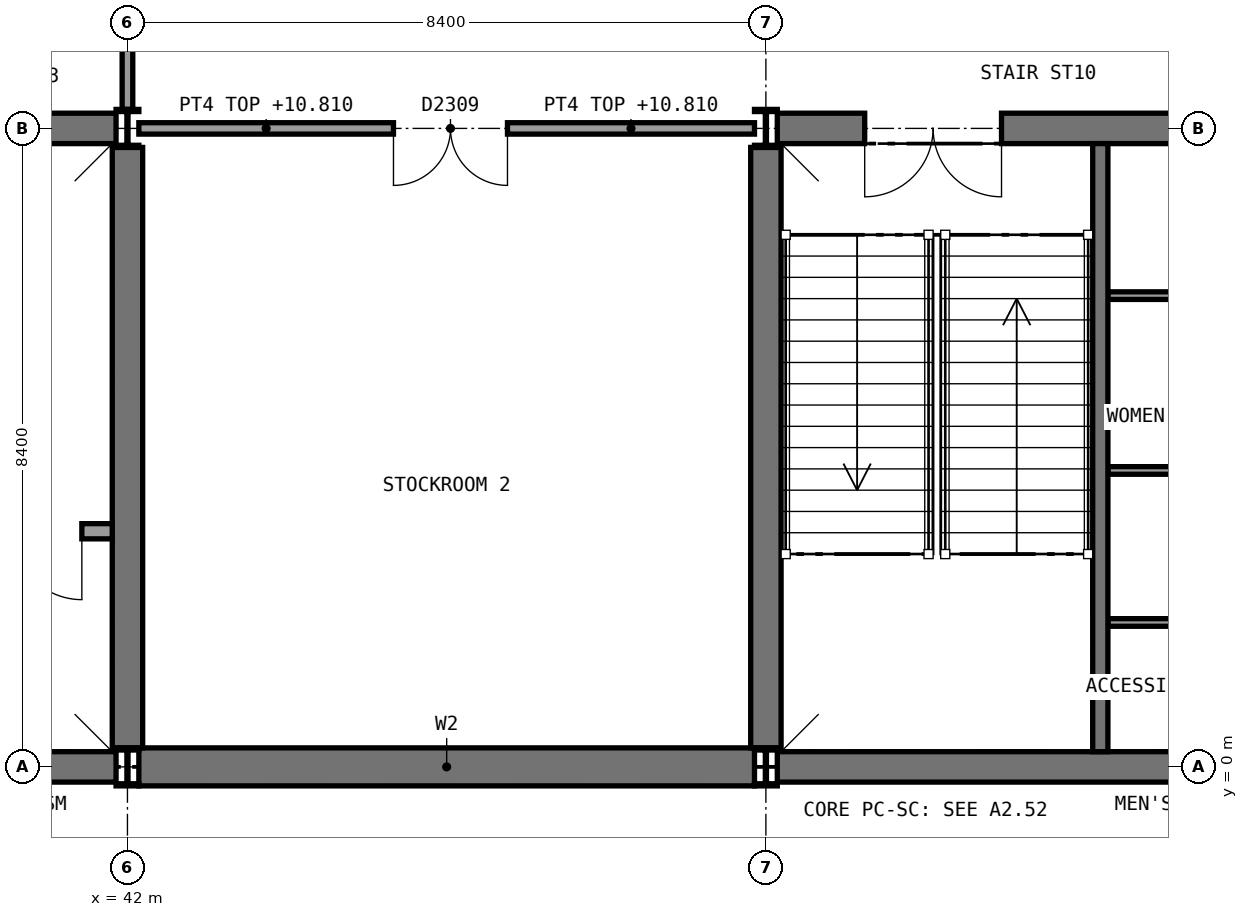
"""IFC4 building model, lengths in metres.
Left out: names, types, materials, properties, quantities, classifications, styles, units other than length and angle.
Written with IfcOpenShell. Run it as: python <this file> out.ifc"""

import sys

from ifc_helpers import new_model, si_unit, direction, frame, frame_2d, origin, origin_2d, place, context, subcontext, project, spatial, rectangle, i_section, extrude, element, fill, save


model = new_model("IFC4")
c1 = context("Model", 3, precision=1e-05, world=origin(), true_north=direction((0.0, 1.0)))
c2 = subcontext(c1, "Body", "Model", "MODEL_VIEW")
j1 = project(units=[si_unit("LENGTHUNIT", "METRE"), si_unit("PLANEANGLEUNIT", "RADIAN")], contexts=[c1])
p1 = place(None, origin())
s1 = spatial("IfcSite", under=j1, at=p1, CompositionType="ELEMENT")
p2 = place(p1, origin())
s2 = spatial("IfcBuilding", under=s1, at=p2, CompositionType="ELEMENT")
p3 = place(p2, frame((0.0, 0.0, 6.0)))
s3 = spatial("IfcBuildingStorey", under=s2, at=p3, CompositionType="ELEMENT", Elevation=6.0)
p4 = place(p3, frame((42.15, 0.0, 0.0), z_axis=(0.0, 0.0, 1.0), x_axis=(1.0, 0.0, 0.0)))
e1 = element("IfcWall", 1, at=p4, inside=s3, PredefinedType="SHEAR", context=c2, shape_type="SweptSolid", body=[
    extrude(rectangle(XDim=8.1, YDim=0.5, at=frame_2d((4.05, 0.0))), origin(), (0.0, 0.0, 1.0), 5.25),
])
p5 = place(p3, frame((33.75, 0.0, 0.0), z_axis=(0.0, 0.0, 1.0), x_axis=(1.0, 0.0, 0.0)))
e2 = element("IfcWall", 2, at=p5, inside=s3, PredefinedType="SHEAR", context=c2, shape_type="SweptSolid", body=[
    extrude(rectangle(XDim=8.1, YDim=0.4, at=frame_2d((4.05, 0.0))), origin(), (0.0, 0.0, 1.0), 5.25),
])
p6 = place(p3, frame((33.75, 8.4, 0.0), z_axis=(0.0, 0.0, 1.0), x_axis=(1.0, 0.0, 0.0)))
e3 = element("IfcWall", 3, at=p6, inside=s3, PredefinedType="SHEAR", context=c2, shape_type="SweptSolid", body=[
    extrude(rectangle(XDim=8.1, YDim=0.4, at=frame_2d((4.05, 0.0))), origin(), (0.0, 0.0, 1.0), 5.25),
])
p7 = place(p6, frame((1.15, 0.0, 0.0)))
e4 = element("IfcOpeningElement", 4, at=p7, cuts=e3, PredefinedType="OPENING", context=c2, shape_type="SweptSolid", body=[
    extrude(rectangle(XDim=1.8, YDim=2.1, at=frame_2d((0.9, 1.05))), frame((0.0, 0.21, 0.0), z_axis=(0.0, -1.0, 0.0), x_axis=(1.0, 0.0, 0.0)), (0.0, 0.0, 1.0), 0.42),
])
p8 = place(p6, frame((5.3, 0.0, 0.0)))
e5 = element("IfcOpeningElement", 5, at=p8, cuts=e3, PredefinedType="OPENING", context=c2, shape_type="SweptSolid", body=[
    extrude(rectangle(XDim=1.8, YDim=2.1, at=frame_2d((0.9, 1.05))), frame((0.0, 0.21, 0.0), z_axis=(0.0, -1.0, 0.0), x_axis=(1.0, 0.0, 0.0)), (0.0, 0.0, 1.0), 0.42),
])
p9 = place(p3, frame((42.0, 0.25, 0.0), z_axis=(0.0, 0.0, 1.0), x_axis=(0.0, 1.0, 0.0)))
e6 = element("IfcWall", 6, at=p9, inside=s3, PredefinedType="SHEAR", context=c2, shape_type="SweptSolid", body=[
    extrude(rectangle(XDim=7.9, YDim=0.4, at=frame_2d((3.95, 0.0))), origin(), (0.0, 0.0, 1.0), 5.25),
])
p10 = place(p3, frame((50.55, 0.0, 0.0), z_axis=(0.0, 0.0, 1.0), x_axis=(1.0, 0.0, 0.0)))
e7 = element("IfcWall", 7, at=p10, inside=s3, PredefinedType="SHEAR", context=c2, shape_type="SweptSolid", body=[
    extrude(rectangle(XDim=8.1, YDim=0.4, at=frame_2d((4.05, 0.0))), origin(), (0.0, 0.0, 1.0), 5.25),
])
p11 = place(p3, frame((50.55, 8.4, 0.0), z_axis=(0.0, 0.0, 1.0), x_axis=(1.0, 0.0, 0.0)))
e8 = element("IfcWall", 8, at=p11, inside=s3, PredefinedType="SHEAR", context=c2, shape_type="SweptSolid", body=[
    extrude(rectangle(XDim=8.1, YDim=0.4, at=frame_2d((4.05, 0.0))), origin(), (0.0, 0.0, 1.0), 5.25),
])
p12 = place(p11, frame((1.15, 0.0, 0.0)))
e9 = element("IfcOpeningElement", 9, at=p12, cuts=e8, PredefinedType="OPENING", context=c2, shape_type="SweptSolid", body=[
    extrude(rectangle(XDim=1.8, YDim=2.1, at=frame_2d((0.9, 1.05))), frame((0.0, 0.21, 0.0), z_axis=(0.0, -1.0, 0.0), x_axis=(1.0, 0.0, 0.0)), (0.0, 0.0, 1.0), 0.42),
])
p13 = place(p11, frame((5.6, 0.0, 0.0)))
e10 = element("IfcOpeningElement", 10, at=p13, cuts=e8, PredefinedType="OPENING", context=c2, shape_type="SweptSolid", body=[
    extrude(rectangle(XDim=1.2, YDim=2.1, at=frame_2d((0.6, 1.05))), frame((0.0, 0.21, 0.0), z_axis=(0.0, -1.0, 0.0), x_axis=(1.0, 0.0, 0.0)), (0.0, 0.0, 1.0), 0.42),
])
p14 = place(p3, frame((50.4, 0.25, 0.0), z_axis=(0.0, 0.0, 1.0), x_axis=(0.0, 1.0, 0.0)))
e11 = element("IfcWall", 11, at=p14, inside=s3, PredefinedType="SHEAR", context=c2, shape_type="SweptSolid", body=[
    extrude(rectangle(XDim=7.9, YDim=0.4, at=frame_2d((3.95, 0.0))), origin(), (0.0, 0.0, 1.0), 5.25),
])
for number, where, z_axis, x_axis in (
    (12, (42.0, 0.0, 0.0), (0.0, 0.0, 1.0), (1.0, 0.0, 0.0)),
    (13, (42.0, 8.4, 0.0), (0.0, 0.0, 1.0), (1.0, 0.0, 0.0)),
    (14, (50.4, 0.0, 0.0), (0.0, 0.0, 1.0), (1.0, 0.0, 0.0)),
    (15, (50.4, 8.4, 0.0), (0.0, 0.0, 1.0), (1.0, 0.0, 0.0)),
):
    element("IfcColumn", number, at=place(p3, frame(where, z_axis=z_axis, x_axis=x_axis)), inside=s3, PredefinedType="COLUMN", context=c2, shape_type="SweptSolid", body=[
        extrude(i_section(OverallWidth=0.3, OverallDepth=0.5, WebThickness=0.014, FlangeThickness=0.028, FilletRadius=0.027, at=origin_2d()), origin(), (0.0, 0.0, 1.0), 5.4),
    ])
p15 = place(p3, frame((54.9, 6.2, 0.0), z_axis=(0.0, 0.0, 1.0), x_axis=(1.0, 0.0, 0.0)))
e16 = element("IfcWall", 16, at=p15, inside=s3, PredefinedType="PARTITIONING", context=c2, shape_type="SweptSolid", body=[
    extrude(rectangle(XDim=2.4, YDim=0.1, at=frame_2d((1.2, 0.0))), origin(), (0.0, 0.0, 1.0), 5.18),
])
p16 = place(p15, frame((0.85, 0.0, 0.0)))
e17 = element("IfcOpeningElement", 17, at=p16, cuts=e16, PredefinedType="OPENING", context=c2, shape_type="SweptSolid", body=[
    extrude(rectangle(XDim=0.9, YDim=2.1, at=frame_2d((0.45, 1.05))), frame((0.0, 0.06, 0.0), z_axis=(0.0, -1.0, 0.0), x_axis=(1.0, 0.0, 0.0)), (0.0, 0.0, 1.0), 0.12),
])
for number, where, z_axis, x_axis in (
    (18, (54.9, 3.9, 0.0), (0.0, 0.0, 1.0), (1.0, 0.0, 0.0)),
    (19, (54.9, 1.9, 0.0), (0.0, 0.0, 1.0), (1.0, 0.0, 0.0)),
):
    element("IfcWall", number, at=place(p3, frame(where, z_axis=z_axis, x_axis=x_axis)), inside=s3, PredefinedType="PARTITIONING", context=c2, shape_type="SweptSolid", body=[
        extrude(rectangle(XDim=2.4, YDim=0.1, at=frame_2d((1.2, 0.0))), origin(), (0.0, 0.0, 1.0), 5.18),
    ])
p17 = place(p3, frame((42.15, 8.4, 0.0), z_axis=(0.0, 0.0, 1.0), x_axis=(1.0, 0.0, 0.0)))
e20 = element("IfcWall", 20, at=p17, inside=s3, PredefinedType="SOLIDWALL", context=c2, shape_type="SweptSolid", body=[
    extrude(rectangle(XDim=8.1, YDim=0.15, at=frame_2d((4.05, 0.0))), origin(), (0.0, 0.0, 1.0), 4.81),
])
p18 = place(p17, frame((3.35, 0.0, 0.0)))
e21 = element("IfcOpeningElement", 21, at=p18, cuts=e20, PredefinedType="OPENING", context=c2, shape_type="SweptSolid", body=[
    extrude(rectangle(XDim=1.5, YDim=2.1, at=frame_2d((0.75, 1.05))), frame((0.0, 0.085, 0.0), z_axis=(0.0, -1.0, 0.0), x_axis=(1.0, 0.0, 0.0)), (0.0, 0.0, 1.0), 0.17),
])
p19 = place(p3, frame((42.0, 8.65, 0.0), z_axis=(0.0, 0.0, 1.0), x_axis=(0.0, 1.0, 0.0)))
e22 = element("IfcWall", 22, at=p19, inside=s3, PredefinedType="PARTITIONING", context=c2, shape_type="SweptSolid", body=[
    extrude(rectangle(XDim=3.1, YDim=0.14, at=frame_2d((1.55, 0.0))), origin(), (0.0, 0.0, 1.0), 4.81),
])
p20 = place(p3, frame((40.05, 3.1, 0.0), z_axis=(0.0, 0.0, 1.0), x_axis=(1.0, 0.0, 0.0)))
e23 = element("IfcWall", 23, at=p20, inside=s3, PredefinedType="PARTITIONING", context=c2, shape_type="SweptSolid", body=[
    extrude(rectangle(XDim=1.75, YDim=0.2, at=frame_2d((0.875, 0.0))), origin(), (0.0, 0.0, 1.0), 5.25),
])
p21 = place(p20, frame((0.45, 0.0, 0.0)))
e24 = element("IfcOpeningElement", 24, at=p21, cuts=e23, PredefinedType="OPENING", context=c2, shape_type="SweptSolid", body=[
    extrude(rectangle(XDim=0.9, YDim=2.1, at=frame_2d((0.45, 1.05))), frame((0.0, 0.11, 0.0), z_axis=(0.0, -1.0, 0.0), x_axis=(1.0, 0.0, 0.0)), (0.0, 0.0, 1.0), 0.22),
])
p22 = place(p3, frame((54.8, 0.2, 0.0), z_axis=(0.0, 0.0, 1.0), x_axis=(0.0, 1.0, 0.0)))
e25 = element("IfcWall", 25, at=p22, inside=s3, PredefinedType="SHEAR", context=c2, shape_type="SweptSolid", body=[
    extrude(rectangle(XDim=8.0, YDim=0.2, at=frame_2d((4.0, 0.0))), origin(), (0.0, 0.0, 1.0), 5.25),
])
p23 = place(p18, frame((1.5, 0.0, 0.0), z_axis=(0.0, 0.0, 1.0), x_axis=(-1.0, 0.0, 0.0)))
e26 = element("IfcDoor", 26, at=p23, inside=s3, OperationType="DOUBLE_DOOR_SINGLE_SWING", PredefinedType="DOOR", context=c2, shape_type="SweptSolid", body=[
    extrude(rectangle(XDim=1.5, YDim=2.1, at=frame_2d((0.75, 1.05))), frame((0.0, 0.025, 0.0), z_axis=(0.0, -1.0, 0.0), x_axis=(1.0, 0.0, 0.0)), (0.0, 0.0, 1.0), 0.05),
])
fill(e21, e26)
p24 = place(p21, frame((0.9, 0.0, 0.0), z_axis=(0.0, 0.0, 1.0), x_axis=(-1.0, 0.0, 0.0)))
e27 = element("IfcDoor", 27, at=p24, inside=s3, OperationType="SINGLE_SWING_LEFT", PredefinedType="DOOR", context=c2, shape_type="SweptSolid", body=[
    extrude(rectangle(XDim=0.9, YDim=2.1, at=frame_2d((0.45, 1.05))), frame((0.0, 0.025, 0.0), z_axis=(0.0, -1.0, 0.0), x_axis=(1.0, 0.0, 0.0)), (0.0, 0.0, 1.0), 0.05),
])
fill(e24, e27)
p25 = place(p12, frame((1.8, 0.0, 0.0), z_axis=(0.0, 0.0, 1.0), x_axis=(-1.0, 0.0, 0.0)))
e28 = element("IfcDoor", 28, at=p25, inside=s3, OperationType="DOUBLE_DOOR_SINGLE_SWING", PredefinedType="DOOR", context=c2, shape_type="SweptSolid", body=[
    extrude(rectangle(XDim=1.8, YDim=2.1, at=frame_2d((0.9, 1.05))), frame((0.0, 0.025, 0.0), z_axis=(0.0, -1.0, 0.0), x_axis=(1.0, 0.0, 0.0)), (0.0, 0.0, 1.0), 0.05),
])
fill(e9, e28)
save(model, sys.argv[1])
